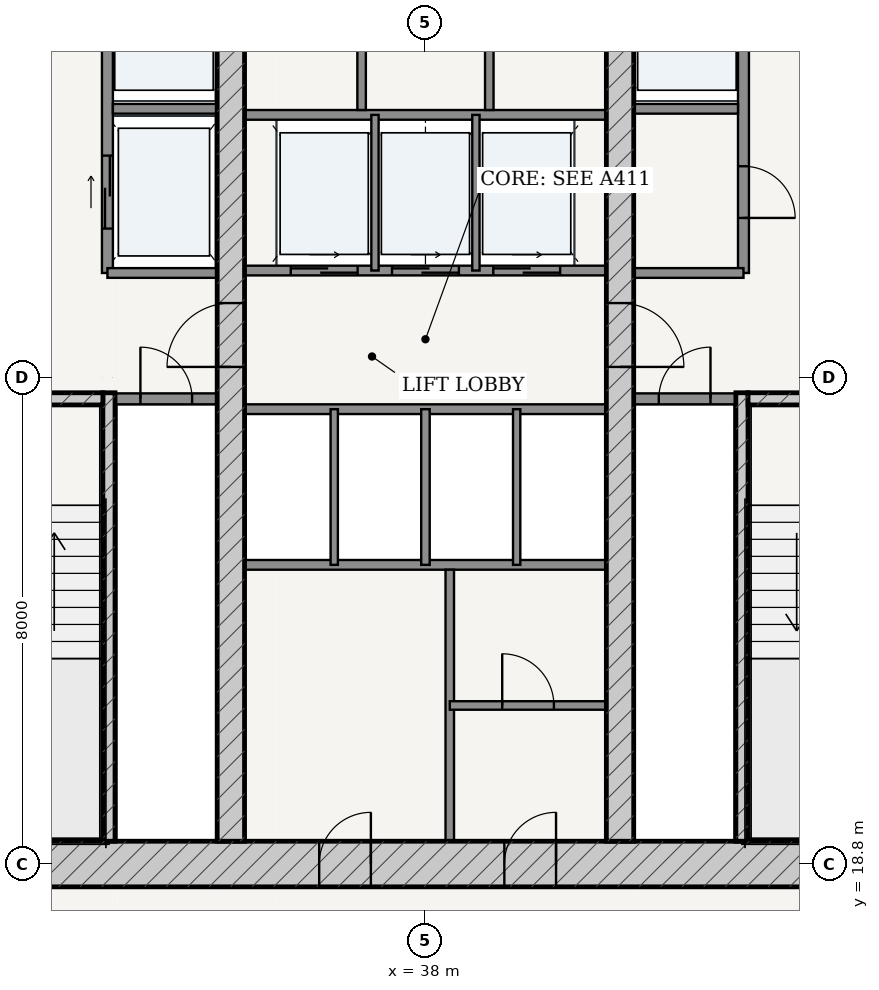
"""IFC4 building model, lengths in metres.
Left out: names, types, materials, properties, quantities, classifications, styles, units other than length and angle.
Written with IfcOpenShell. Run it as: python <this file> out.ifc"""

import sys

from ifc_helpers import new_model, si_unit, direction, frame, frame_2d, origin, place, context, subcontext, project, spatial, rectangle, extrude, source, transform, mapped, element, fill, save


model = new_model("IFC4")
c1 = context("Model", 3, precision=1e-05, world=origin(), true_north=direction((-0.2419218956, 0.970295726276)))
c2 = subcontext(c1, "Body", "Model", "MODEL_VIEW")
j1 = project(units=[si_unit("LENGTHUNIT", "METRE"), si_unit("PLANEANGLEUNIT", "RADIAN")], contexts=[c1])
p1 = place(None, origin())
s1 = spatial("IfcSite", under=j1, at=p1, CompositionType="ELEMENT")
p2 = place(p1, origin())
s2 = spatial("IfcBuilding", under=s1, at=p2, CompositionType="ELEMENT")
p3 = place(p2, frame((0.0, 0.0, 49.2)))
s3 = spatial("IfcBuildingStorey", under=s2, at=p3, CompositionType="ELEMENT", Elevation=49.2)
p4 = place(p3, frame((28.625, 18.8, 0.0), z_axis=(0.0, 0.0, 1.0), x_axis=(1.0, 0.0, 0.0)))
e1 = element("IfcWall", 1, at=p4, inside=s3, PredefinedType="SHEAR", context=c2, shape_type="SweptSolid", body=[
    extrude(rectangle(XDim=18.75, YDim=0.75, at=frame_2d((9.375, 0.0))), origin(), (0.0, 0.0, 1.0), 3.32),
])
p5 = place(p4, frame((7.627, 0.0, 0.0)))
e2 = element("IfcOpeningElement", 2, at=p5, cuts=e1, PredefinedType="OPENING", context=c2, shape_type="SweptSolid", body=[
    extrude(rectangle(XDim=0.85, YDim=2.1, at=frame_2d((0.425, 1.05))), frame((0.0, 0.385, 0.0), z_axis=(0.0, -1.0, 0.0), x_axis=(1.0, 0.0, 0.0)), (0.0, 0.0, 1.0), 0.77),
])
p6 = place(p4, frame((10.673, 0.0, 0.0)))
e3 = element("IfcOpeningElement", 3, at=p6, cuts=e1, PredefinedType="OPENING", context=c2, shape_type="SweptSolid", body=[
    extrude(rectangle(XDim=0.85, YDim=2.1, at=frame_2d((0.425, 1.05))), frame((0.0, 0.385, 0.0), z_axis=(0.0, -1.0, 0.0), x_axis=(1.0, 0.0, 0.0)), (0.0, 0.0, 1.0), 0.77),
])
p7 = place(p3, frame((32.795, 19.175, 0.0), z_axis=(0.0, 0.0, 1.0), x_axis=(0.0, 1.0, 0.0)))
e4 = element("IfcWall", 4, at=p7, inside=s3, PredefinedType="SOLIDWALL", context=c2, shape_type="SweptSolid", body=[
    extrude(rectangle(XDim=7.375, YDim=0.2, at=frame_2d((3.688, 0.0))), origin(), (0.0, 0.0, 1.0), 3.32),
])
p8 = place(p3, frame((29.375, 26.45, 0.0), z_axis=(0.0, 0.0, 1.0), x_axis=(1.0, 0.0, 0.0)))
e5 = element("IfcWall", 5, at=p8, inside=s3, PredefinedType="SOLIDWALL", context=c2, shape_type="SweptSolid", body=[
    extrude(rectangle(XDim=3.32, YDim=0.2, at=frame_2d((1.66, 0.0))), origin(), (0.0, 0.0, 1.0), 3.32),
])
p9 = place(p8, frame((1.185, 0.0, 0.0)))
e6 = element("IfcOpeningElement", 6, at=p9, cuts=e5, PredefinedType="OPENING", context=c2, shape_type="SweptSolid", body=[
    extrude(rectangle(XDim=0.95, YDim=2.15, at=frame_2d((0.475, 1.075))), frame((0.0, 0.11, 0.0), z_axis=(0.0, -1.0, 0.0), x_axis=(1.0, 0.0, 0.0)), (0.0, 0.0, 1.0), 0.22),
])
p10 = place(p3, frame((43.205, 19.175, 0.0), z_axis=(0.0, 0.0, 1.0), x_axis=(0.0, 1.0, 0.0)))
e7 = element("IfcWall", 7, at=p10, inside=s3, PredefinedType="SOLIDWALL", context=c2, shape_type="SweptSolid", body=[
    extrude(rectangle(XDim=7.375, YDim=0.2, at=frame_2d((3.688, 0.0))), origin(), (0.0, 0.0, 1.0), 3.32),
])
p11 = place(p3, frame((43.305, 26.45, 0.0), z_axis=(0.0, 0.0, 1.0), x_axis=(1.0, 0.0, 0.0)))
e8 = element("IfcWall", 8, at=p11, inside=s3, PredefinedType="SOLIDWALL", context=c2, shape_type="SweptSolid", body=[
    extrude(rectangle(XDim=3.32, YDim=0.2, at=frame_2d((1.66, 0.0))), origin(), (0.0, 0.0, 1.0), 3.32),
])
p12 = place(p11, frame((1.185, 0.0, 0.0)))
e9 = element("IfcOpeningElement", 9, at=p12, cuts=e8, PredefinedType="OPENING", context=c2, shape_type="SweptSolid", body=[
    extrude(rectangle(XDim=0.95, YDim=2.15, at=frame_2d((0.475, 1.075))), frame((0.0, 0.11, 0.0), z_axis=(0.0, -1.0, 0.0), x_axis=(1.0, 0.0, 0.0)), (0.0, 0.0, 1.0), 0.22),
])
p13 = place(p3, frame((34.8, 19.175, 0.0), z_axis=(0.0, 0.0, 1.0), x_axis=(0.0, 1.0, 0.0)))
e10 = element("IfcWall", 10, at=p13, inside=s3, PredefinedType="SHEAR", context=c2, shape_type="SweptSolid", body=[
    extrude(rectangle(XDim=15.25, YDim=0.45, at=frame_2d((7.625, 0.0))), origin(), (0.0, 0.0, 1.0), 3.32),
])
p14 = place(p13, frame((7.8, 0.0, 0.0)))
e11 = element("IfcOpeningElement", 11, at=p14, cuts=e10, PredefinedType="OPENING", context=c2, shape_type="SweptSolid", body=[
    extrude(rectangle(XDim=1.05, YDim=2.15, at=frame_2d((0.525, 1.075))), frame((0.0, 0.235, 0.0), z_axis=(0.0, -1.0, 0.0), x_axis=(1.0, 0.0, 0.0)), (0.0, 0.0, 1.0), 0.47),
])
p15 = place(p3, frame((41.2, 19.175, 0.0), z_axis=(0.0, 0.0, 1.0), x_axis=(0.0, 1.0, 0.0)))
e12 = element("IfcWall", 12, at=p15, inside=s3, PredefinedType="SHEAR", context=c2, shape_type="SweptSolid", body=[
    extrude(rectangle(XDim=15.25, YDim=0.45, at=frame_2d((7.625, 0.0))), origin(), (0.0, 0.0, 1.0), 3.32),
])
p16 = place(p15, frame((7.8, 0.0, 0.0)))
e13 = element("IfcOpeningElement", 13, at=p16, cuts=e12, PredefinedType="OPENING", context=c2, shape_type="SweptSolid", body=[
    extrude(rectangle(XDim=1.05, YDim=2.15, at=frame_2d((0.525, 1.075))), frame((0.0, 0.235, 0.0), z_axis=(0.0, -1.0, 0.0), x_axis=(1.0, 0.0, 0.0)), (0.0, 0.0, 1.0), 0.47),
])
p17 = place(p3, frame((32.9, 26.45, 0.0), z_axis=(0.0, 0.0, 1.0), x_axis=(1.0, 0.0, 0.0)))
e14 = element("IfcWall", 14, at=p17, inside=s3, PredefinedType="PARTITIONING", context=c2, shape_type="SweptSolid", body=[
    extrude(rectangle(XDim=1.675, YDim=0.18, at=frame_2d((0.837, 0.0))), origin(), (0.0, 0.0, 1.0), 3.32),
])
p18 = place(p17, frame((0.413, 0.0, 0.0)))
e15 = element("IfcOpeningElement", 15, at=p18, cuts=e14, PredefinedType="OPENING", context=c2, shape_type="SweptSolid", body=[
    extrude(rectangle(XDim=0.85, YDim=2.1, at=frame_2d((0.425, 1.05))), frame((0.0, 0.1, 0.0), z_axis=(0.0, -1.0, 0.0), x_axis=(1.0, 0.0, 0.0)), (0.0, 0.0, 1.0), 0.2),
])
p19 = place(p3, frame((41.425, 26.45, 0.0), z_axis=(0.0, 0.0, 1.0), x_axis=(1.0, 0.0, 0.0)))
e16 = element("IfcWall", 16, at=p19, inside=s3, PredefinedType="PARTITIONING", context=c2, shape_type="SweptSolid", body=[
    extrude(rectangle(XDim=1.675, YDim=0.18, at=frame_2d((0.837, 0.0))), origin(), (0.0, 0.0, 1.0), 3.32),
])
p20 = place(p19, frame((0.413, 0.0, 0.0)))
e17 = element("IfcOpeningElement", 17, at=p20, cuts=e16, PredefinedType="OPENING", context=c2, shape_type="SweptSolid", body=[
    extrude(rectangle(XDim=0.85, YDim=2.1, at=frame_2d((0.425, 1.05))), frame((0.0, 0.1, 0.0), z_axis=(0.0, -1.0, 0.0), x_axis=(1.0, 0.0, 0.0)), (0.0, 0.0, 1.0), 0.2),
])
p21 = place(p3, frame((32.77, 28.52, 0.0), z_axis=(0.0, 0.0, 1.0), x_axis=(0.0, 1.0, 0.0)))
e18 = element("IfcWall", 18, at=p21, inside=s3, PredefinedType="PARTITIONING", context=c2, shape_type="SweptSolid", body=[
    extrude(rectangle(XDim=5.905, YDim=0.18, at=frame_2d((2.953, 0.0))), origin(), (0.0, 0.0, 1.0), 3.32),
])
p22 = place(p21, frame((3.655, 0.0, 0.0)))
e19 = element("IfcOpeningElement", 19, at=p22, cuts=e18, PredefinedType="OPENING", context=c2, shape_type="SweptSolid", body=[
    extrude(rectangle(XDim=1.15, YDim=2.2, at=frame_2d((0.575, 1.1))), frame((0.0, 0.1, 0.0), z_axis=(0.0, -1.0, 0.0), x_axis=(1.0, 0.0, 0.0)), (0.0, 0.0, 1.0), 0.2),
])
p23 = place(p21, frame((0.73, 0.0, 0.0)))
e20 = element("IfcOpeningElement", 20, at=p23, cuts=e18, PredefinedType="OPENING", context=c2, shape_type="SweptSolid", body=[
    extrude(rectangle(XDim=1.2, YDim=2.25, at=frame_2d((0.6, 1.125))), frame((0.0, 0.1, 0.0), z_axis=(0.0, -1.0, 0.0), x_axis=(1.0, 0.0, 0.0)), (0.0, 0.0, 1.0), 0.2),
])
p24 = place(p3, frame((32.86, 31.22, 0.0), z_axis=(0.0, 0.0, 1.0), x_axis=(1.0, 0.0, 0.0)))
e21 = element("IfcWall", 21, at=p24, inside=s3, PredefinedType="PARTITIONING", context=c2, shape_type="SweptSolid", body=[
    extrude(rectangle(XDim=1.715, YDim=0.16, at=frame_2d((0.857, 0.0))), origin(), (0.0, 0.0, 1.0), 3.32),
])
p25 = place(p3, frame((32.77, 28.52, 0.0), z_axis=(0.0, 0.0, 1.0), x_axis=(1.0, 0.0, 0.0)))
e22 = element("IfcWall", 22, at=p25, inside=s3, PredefinedType="PARTITIONING", context=c2, shape_type="SweptSolid", body=[
    extrude(rectangle(XDim=1.805, YDim=0.16, at=frame_2d((0.902, 0.0))), origin(), (0.0, 0.0, 1.0), 3.32),
])
p26 = place(p3, frame((43.23, 28.52, 0.0), z_axis=(0.0, 0.0, 1.0), x_axis=(0.0, 1.0, 0.0)))
e23 = element("IfcWall", 23, at=p26, inside=s3, PredefinedType="PARTITIONING", context=c2, shape_type="SweptSolid", body=[
    extrude(rectangle(XDim=5.905, YDim=0.18, at=frame_2d((2.953, 0.0))), origin(), (0.0, 0.0, 1.0), 3.32),
])
p27 = place(p26, frame((0.905, 0.0, 0.0)))
e24 = element("IfcOpeningElement", 24, at=p27, cuts=e23, PredefinedType="OPENING", context=c2, shape_type="SweptSolid", body=[
    extrude(rectangle(XDim=0.85, YDim=2.1, at=frame_2d((0.425, 1.05))), frame((0.0, 0.1, 0.0), z_axis=(0.0, -1.0, 0.0), x_axis=(1.0, 0.0, 0.0)), (0.0, 0.0, 1.0), 0.2),
])
p28 = place(p26, frame((3.655, 0.0, 0.0)))
e25 = element("IfcOpeningElement", 25, at=p28, cuts=e23, PredefinedType="OPENING", context=c2, shape_type="SweptSolid", body=[
    extrude(rectangle(XDim=1.15, YDim=2.2, at=frame_2d((0.575, 1.1))), frame((0.0, 0.1, 0.0), z_axis=(0.0, -1.0, 0.0), x_axis=(1.0, 0.0, 0.0)), (0.0, 0.0, 1.0), 0.2),
])
p29 = place(p3, frame((41.425, 31.22, 0.0), z_axis=(0.0, 0.0, 1.0), x_axis=(1.0, 0.0, 0.0)))
e26 = element("IfcWall", 26, at=p29, inside=s3, PredefinedType="PARTITIONING", context=c2, shape_type="SweptSolid", body=[
    extrude(rectangle(XDim=1.715, YDim=0.16, at=frame_2d((0.857, 0.0))), origin(), (0.0, 0.0, 1.0), 3.32),
])
p30 = place(p3, frame((41.425, 28.52, 0.0), z_axis=(0.0, 0.0, 1.0), x_axis=(1.0, 0.0, 0.0)))
e27 = element("IfcWall", 27, at=p30, inside=s3, PredefinedType="PARTITIONING", context=c2, shape_type="SweptSolid", body=[
    extrude(rectangle(XDim=1.805, YDim=0.16, at=frame_2d((0.902, 0.0))), origin(), (0.0, 0.0, 1.0), 3.32),
])
p31 = place(p3, frame((35.025, 28.56, 0.0), z_axis=(0.0, 0.0, 1.0), x_axis=(1.0, 0.0, 0.0)))
e28 = element("IfcWall", 28, at=p31, inside=s3, PredefinedType="PARTITIONING", context=c2, shape_type="SweptSolid", body=[
    extrude(rectangle(XDim=5.95, YDim=0.16, at=frame_2d((2.975, 0.0))), origin(), (0.0, 0.0, 1.0), 3.32),
])
p32 = place(p31, frame((0.76, 0.0, 0.0)))
e29 = element("IfcOpeningElement", 29, at=p32, cuts=e28, PredefinedType="OPENING", context=c2, shape_type="SweptSolid", body=[
    extrude(rectangle(XDim=1.1, YDim=2.2, at=frame_2d((0.55, 1.1))), frame((0.0, 0.09, 0.0), z_axis=(0.0, -1.0, 0.0), x_axis=(1.0, 0.0, 0.0)), (0.0, 0.0, 1.0), 0.18),
])
p33 = place(p31, frame((2.425, 0.0, 0.0)))
e30 = element("IfcOpeningElement", 30, at=p33, cuts=e28, PredefinedType="OPENING", context=c2, shape_type="SweptSolid", body=[
    extrude(rectangle(XDim=1.1, YDim=2.2, at=frame_2d((0.55, 1.1))), frame((0.0, 0.09, 0.0), z_axis=(0.0, -1.0, 0.0), x_axis=(1.0, 0.0, 0.0)), (0.0, 0.0, 1.0), 0.18),
])
p34 = place(p31, frame((4.09, 0.0, 0.0)))
e31 = element("IfcOpeningElement", 31, at=p34, cuts=e28, PredefinedType="OPENING", context=c2, shape_type="SweptSolid", body=[
    extrude(rectangle(XDim=1.1, YDim=2.2, at=frame_2d((0.55, 1.1))), frame((0.0, 0.09, 0.0), z_axis=(0.0, -1.0, 0.0), x_axis=(1.0, 0.0, 0.0)), (0.0, 0.0, 1.0), 0.18),
])
p35 = place(p3, frame((35.025, 31.12, 0.0), z_axis=(0.0, 0.0, 1.0), x_axis=(1.0, 0.0, 0.0)))
e32 = element("IfcWall", 32, at=p35, inside=s3, PredefinedType="PARTITIONING", context=c2, shape_type="SweptSolid", body=[
    extrude(rectangle(XDim=5.95, YDim=0.16, at=frame_2d((2.975, 0.0))), origin(), (0.0, 0.0, 1.0), 3.32),
])
for number, where, z_axis, x_axis in (
    (33, (37.17, 28.56, 0.0), (0.0, 0.0, 1.0), (0.0, 1.0, 0.0)),
    (34, (38.83, 28.56, 0.0), (0.0, 0.0, 1.0), (0.0, 1.0, 0.0)),
):
    element("IfcWall", number, at=place(p3, frame(where, z_axis=z_axis, x_axis=x_axis)), inside=s3, PredefinedType="PARTITIONING", context=c2, shape_type="SweptSolid", body=[
        extrude(rectangle(XDim=2.56, YDim=0.12, at=frame_2d((1.28, 0.0))), origin(), (0.0, 0.0, 1.0), 3.32),
    ])
for number, where, z_axis, x_axis in (
    (35, (36.95, 31.2, 0.0), (0.0, 0.0, 1.0), (0.0, 1.0, 0.0)),
    (36, (39.05, 31.2, 0.0), (0.0, 0.0, 1.0), (0.0, 1.0, 0.0)),
):
    element("IfcWall", number, at=place(p3, frame(where, z_axis=z_axis, x_axis=x_axis)), inside=s3, PredefinedType="PARTITIONING", context=c2, shape_type="SweptSolid", body=[
        extrude(rectangle(XDim=3.225, YDim=0.14, at=frame_2d((1.613, 0.0))), origin(), (0.0, 0.0, 1.0), 3.32),
    ])
for number, where, z_axis, x_axis in (
    (37, (35.025, 26.28, 0.0), (0.0, 0.0, 1.0), (1.0, 0.0, 0.0)),
    (38, (35.025, 23.72, 0.0), (0.0, 0.0, 1.0), (1.0, 0.0, 0.0)),
):
    element("IfcWall", number, at=place(p3, frame(where, z_axis=z_axis, x_axis=x_axis)), inside=s3, PredefinedType="PARTITIONING", context=c2, shape_type="SweptSolid", body=[
        extrude(rectangle(XDim=5.95, YDim=0.16, at=frame_2d((2.975, 0.0))), origin(), (0.0, 0.0, 1.0), 3.32),
    ])
p36 = place(p3, frame((36.5, 23.72, 0.0), z_axis=(0.0, 0.0, 1.0), x_axis=(0.0, 1.0, 0.0)))
e39 = element("IfcWall", 39, at=p36, inside=s3, PredefinedType="PARTITIONING", context=c2, shape_type="SweptSolid", body=[
    extrude(rectangle(XDim=2.56, YDim=0.12, at=frame_2d((1.28, 0.0))), origin(), (0.0, 0.0, 1.0), 3.32),
])
p37 = place(p3, frame((38.0, 23.72, 0.0), z_axis=(0.0, 0.0, 1.0), x_axis=(0.0, 1.0, 0.0)))
e40 = element("IfcWall", 40, at=p37, inside=s3, PredefinedType="PARTITIONING", context=c2, shape_type="SweptSolid", body=[
    extrude(rectangle(XDim=2.56, YDim=0.14, at=frame_2d((1.28, 0.0))), origin(), (0.0, 0.0, 1.0), 3.32),
])
p38 = place(p3, frame((39.5, 23.72, 0.0), z_axis=(0.0, 0.0, 1.0), x_axis=(0.0, 1.0, 0.0)))
e41 = element("IfcWall", 41, at=p38, inside=s3, PredefinedType="PARTITIONING", context=c2, shape_type="SweptSolid", body=[
    extrude(rectangle(XDim=2.56, YDim=0.12, at=frame_2d((1.28, 0.0))), origin(), (0.0, 0.0, 1.0), 3.32),
])
p39 = place(p3, frame((38.4, 19.175, 0.0), z_axis=(0.0, 0.0, 1.0), x_axis=(0.0, 1.0, 0.0)))
e42 = element("IfcWall", 42, at=p39, inside=s3, PredefinedType="PARTITIONING", context=c2, shape_type="SweptSolid", body=[
    extrude(rectangle(XDim=4.465, YDim=0.14, at=frame_2d((2.232, 0.0))), origin(), (0.0, 0.0, 1.0), 3.32),
])
p40 = place(p3, frame((38.4, 21.407, 0.0), z_axis=(0.0, 0.0, 1.0), x_axis=(1.0, 0.0, 0.0)))
e43 = element("IfcWall", 43, at=p40, inside=s3, PredefinedType="PARTITIONING", context=c2, shape_type="SweptSolid", body=[
    extrude(rectangle(XDim=2.575, YDim=0.14, at=frame_2d((1.288, 0.0))), origin(), (0.0, 0.0, 1.0), 3.32),
])
p41 = place(p40, frame((0.863, 0.0, 0.0)))
e44 = element("IfcOpeningElement", 44, at=p41, cuts=e43, PredefinedType="OPENING", context=c2, shape_type="SweptSolid", body=[
    extrude(rectangle(XDim=0.85, YDim=2.1, at=frame_2d((0.425, 1.05))), frame((0.0, 0.08, 0.0), z_axis=(0.0, -1.0, 0.0), x_axis=(1.0, 0.0, 0.0)), (0.0, 0.0, 1.0), 0.16),
])
m1 = source(origin(), c2, "Body", "SweptSolid", [
    extrude(rectangle(XDim=1.05, YDim=2.15, at=frame_2d((0.525, 1.075))), frame((0.0, 0.025, 0.0), z_axis=(0.0, -1.0, 0.0), x_axis=(1.0, 0.0, 0.0)), (0.0, 0.0, 1.0), 0.05),
])
p42 = place(p14, origin())
e45 = element("IfcDoor", 45, at=p42, inside=s3, OperationType="SINGLE_SWING_LEFT", PredefinedType="DOOR", context=c2, shape_type="MappedRepresentation", body=[
    mapped(m1, transform((0.0, 0.0, 0.0), scale=1.0)),
])
fill(e11, e45)
p43 = place(p16, frame((1.05, 0.0, 0.0), z_axis=(0.0, 0.0, 1.0), x_axis=(-1.0, 0.0, 0.0)))
e46 = element("IfcDoor", 46, at=p43, inside=s3, OperationType="SINGLE_SWING_RIGHT", PredefinedType="DOOR", context=c2, shape_type="MappedRepresentation", body=[
    mapped(m1, transform((0.0, 0.0, 0.0), scale=1.0)),
])
fill(e13, e46)
m2 = source(origin(), c2, "Body", "SweptSolid", [
    extrude(rectangle(XDim=0.85, YDim=2.1, at=frame_2d((0.425, 1.05))), frame((0.0, 0.025, 0.0), z_axis=(0.0, -1.0, 0.0), x_axis=(1.0, 0.0, 0.0)), (0.0, 0.0, 1.0), 0.05),
])
p44 = place(p18, origin())
e47 = element("IfcDoor", 47, at=p44, inside=s3, OperationType="SINGLE_SWING_LEFT", PredefinedType="DOOR", context=c2, shape_type="MappedRepresentation", body=[
    mapped(m2, transform((0.0, 0.0, 0.0), scale=1.0)),
])
fill(e15, e47)
p45 = place(p20, origin())
e48 = element("IfcDoor", 48, at=p45, inside=s3, OperationType="SINGLE_SWING_RIGHT", PredefinedType="DOOR", context=c2, shape_type="MappedRepresentation", body=[
    mapped(m2, transform((0.0, 0.0, 0.0), scale=1.0)),
])
fill(e17, e48)
p46 = place(p27, frame((0.85, 0.0, 0.0), z_axis=(0.0, 0.0, 1.0), x_axis=(-1.0, 0.0, 0.0)))
e49 = element("IfcDoor", 49, at=p46, inside=s3, OperationType="SINGLE_SWING_RIGHT", PredefinedType="DOOR", context=c2, shape_type="MappedRepresentation", body=[
    mapped(m2, transform((0.0, 0.0, 0.0), scale=1.0)),
])
fill(e24, e49)
p47 = place(p5, origin())
e50 = element("IfcDoor", 50, at=p47, inside=s3, OperationType="SINGLE_SWING_RIGHT", PredefinedType="DOOR", context=c2, shape_type="MappedRepresentation", body=[
    mapped(m2, transform((0.0, 0.0, 0.0), scale=1.0)),
])
fill(e2, e50)
p48 = place(p6, origin())
e51 = element("IfcDoor", 51, at=p48, inside=s3, OperationType="SINGLE_SWING_RIGHT", PredefinedType="DOOR", context=c2, shape_type="MappedRepresentation", body=[
    mapped(m2, transform((0.0, 0.0, 0.0), scale=1.0)),
])
fill(e3, e51)
p49 = place(p41, origin())
e52 = element("IfcDoor", 52, at=p49, inside=s3, OperationType="SINGLE_SWING_LEFT", PredefinedType="DOOR", context=c2, shape_type="MappedRepresentation", body=[
    mapped(m2, transform((0.0, 0.0, 0.0), scale=1.0)),
])
fill(e44, e52)
m3 = source(origin(), c2, "Body", "SweptSolid", [
    extrude(rectangle(XDim=1.2, YDim=2.25, at=frame_2d((0.6, 1.125))), frame((0.0, 0.025, 0.0), z_axis=(0.0, -1.0, 0.0), x_axis=(1.0, 0.0, 0.0)), (0.0, 0.0, 1.0), 0.05),
])
p50 = place(p23, origin())
e53 = element("IfcDoor", 53, at=p50, inside=s3, OperationType="DOUBLE_DOOR_SLIDING", PredefinedType="DOOR", context=c2, shape_type="MappedRepresentation", body=[
    mapped(m3, transform((0.0, 0.0, 0.0), scale=1.0)),
])
fill(e20, e53)
m4 = source(origin(), c2, "Body", "SweptSolid", [
    extrude(rectangle(XDim=1.1, YDim=2.2, at=frame_2d((0.55, 1.1))), frame((0.0, 0.025, 0.0), z_axis=(0.0, -1.0, 0.0), x_axis=(1.0, 0.0, 0.0)), (0.0, 0.0, 1.0), 0.05),
])
p51 = place(p32, origin())
e54 = element("IfcDoor", 54, at=p51, inside=s3, OperationType="DOUBLE_DOOR_SLIDING", PredefinedType="DOOR", context=c2, shape_type="MappedRepresentation", body=[
    mapped(m4, transform((0.0, 0.0, 0.0), scale=1.0)),
])
fill(e29, e54)
p52 = place(p33, origin())
e55 = element("IfcDoor", 55, at=p52, inside=s3, OperationType="DOUBLE_DOOR_SLIDING", PredefinedType="DOOR", context=c2, shape_type="MappedRepresentation", body=[
    mapped(m4, transform((0.0, 0.0, 0.0), scale=1.0)),
])
fill(e30, e55)
p53 = place(p34, origin())
e56 = element("IfcDoor", 56, at=p53, inside=s3, OperationType="DOUBLE_DOOR_SLIDING", PredefinedType="DOOR", context=c2, shape_type="MappedRepresentation", body=[
    mapped(m4, transform((0.0, 0.0, 0.0), scale=1.0)),
])
fill(e31, e56)
save(model, sys.argv[1])
